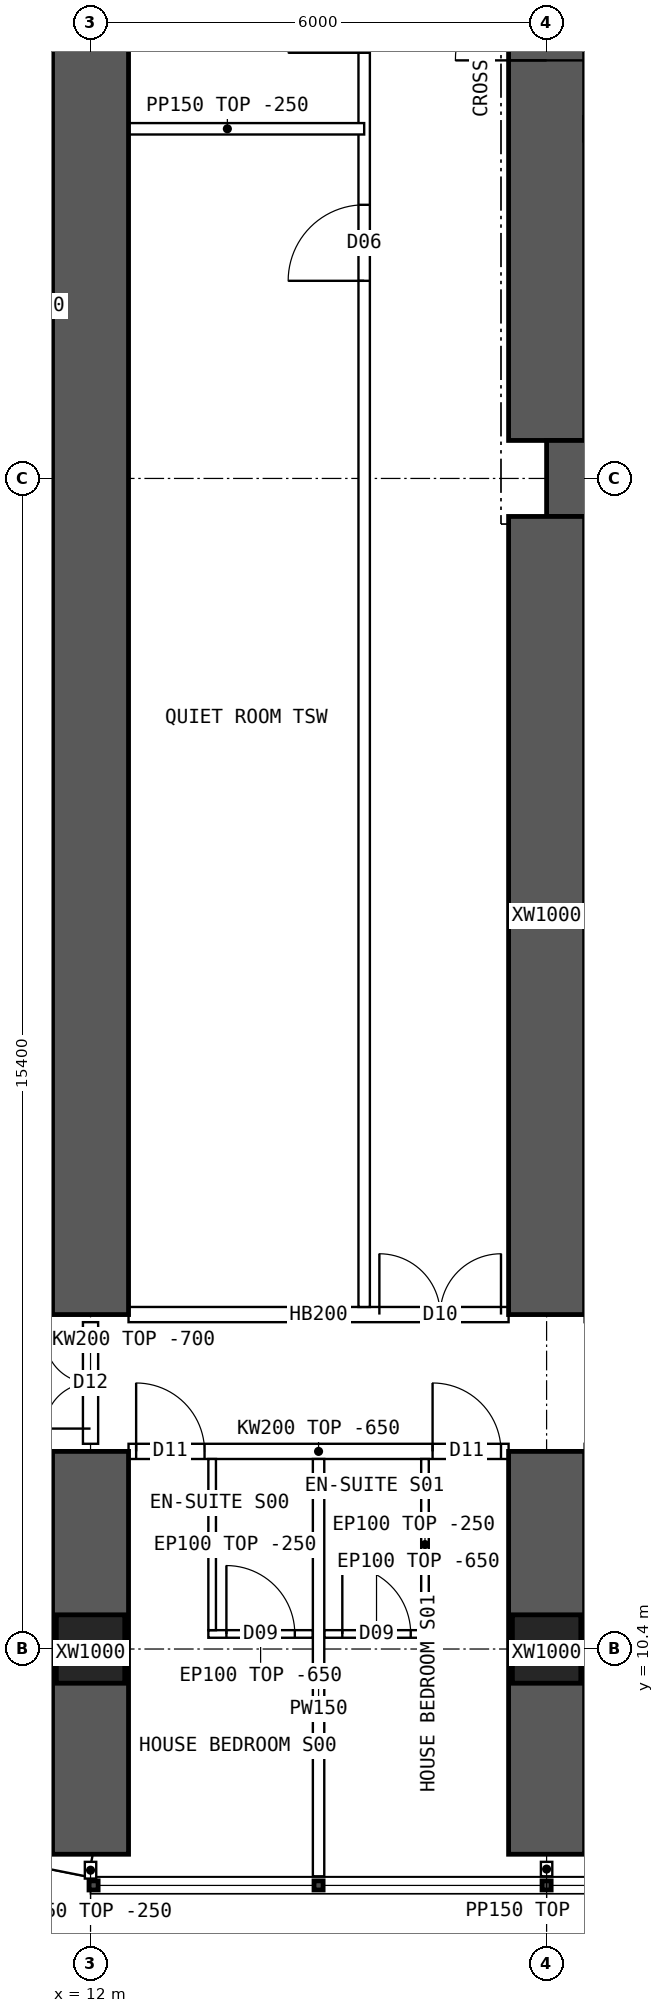
"""IFC4 building model, lengths in metres.
Left out: names, types, materials, properties, quantities, classifications, styles, units other than length and angle.
Written with IfcOpenShell. Run it as: python <this file> out.ifc"""

import sys

from ifc_helpers import new_model, si_unit, direction, frame, frame_2d, origin, origin_2d, place, context, subcontext, project, spatial, polyline, rectangle, hollow_rectangle, outline, extrude, element, fill, save


model = new_model("IFC4")
c1 = context("Model", 3, precision=1e-05, world=origin(), true_north=direction((0.0, 1.0)))
c2 = subcontext(c1, "Body", "Model", "MODEL_VIEW")
j1 = project(units=[si_unit("LENGTHUNIT", "METRE"), si_unit("PLANEANGLEUNIT", "RADIAN")], contexts=[c1])
p1 = place(None, origin())
s1 = spatial("IfcSite", under=j1, at=p1, CompositionType="ELEMENT")
p2 = place(p1, origin())
s2 = spatial("IfcBuilding", under=s1, at=p2, CompositionType="ELEMENT")
p3 = place(p2, frame((0.0, 0.0, 38.95)))
s3 = spatial("IfcBuildingStorey", under=s2, at=p3, CompositionType="ELEMENT", Elevation=38.95)
for number, where, z_axis, x_axis in (
    (1, (12.0, 10.4, 0.0), (0.0, 0.0, 1.0), (1.0, 0.0, 0.0)),
    (2, (18.0, 10.4, 0.0), (0.0, 0.0, 1.0), (1.0, 0.0, 0.0)),
):
    element("IfcColumn", number, at=place(p3, frame(where, z_axis=z_axis, x_axis=x_axis)), inside=s3, PredefinedType="COLUMN", context=c2, shape_type="SweptSolid", body=[
        extrude(hollow_rectangle(XDim=0.9, YDim=0.9, WallThickness=0.09, at=origin_2d()), origin(), (0.0, 0.0, 1.0), 3.75),
    ])
p4 = place(p3, frame((18.0, 25.8, 0.0), z_axis=(0.0, 0.0, 1.0), x_axis=(1.0, 0.0, 0.0)))
e3 = element("IfcWall", 3, at=p4, inside=s3, PredefinedType="SHEAR", context=c2, shape_type="SweptSolid", body=[
    extrude(rectangle(XDim=48.0, YDim=1.0, at=frame_2d((24.0, 0.0))), origin(), (0.0, 0.0, 1.0), 3.75),
])
p5 = place(p3, frame((18.0, 26.3, 0.0), z_axis=(0.0, 0.0, 1.0), x_axis=(0.0, 1.0, 0.0)))
e4 = element("IfcWall", 4, at=p5, inside=s3, PredefinedType="SHEAR", context=c2, shape_type="SweptSolid", body=[
    extrude(rectangle(XDim=11.4, YDim=1.0, at=frame_2d((5.7, 0.0))), origin(), (0.0, 0.0, 1.0), 3.75),
])
p6 = place(p5, frame((5.0, 0.0, 0.0)))
e5 = element("IfcOpeningElement", 5, at=p6, cuts=e4, PredefinedType="OPENING", context=c2, shape_type="SweptSolid", body=[
    extrude(rectangle(XDim=1.2, YDim=2.1, at=frame_2d((0.6, 1.05))), frame((0.0, 0.51, 0.0), z_axis=(0.0, -1.0, 0.0), x_axis=(1.0, 0.0, 0.0)), (0.0, 0.0, 1.0), 1.02),
])
p7 = place(p3, frame((12.0, 7.7, 0.0), z_axis=(0.0, 0.0, 1.0), x_axis=(0.0, 1.0, 0.0)))
e6 = element("IfcWall", 6, at=p7, inside=s3, PredefinedType="SHEAR", context=c2, shape_type="SweptSolid", body=[
    extrude(rectangle(XDim=5.3, YDim=1.0, at=frame_2d((2.65, 0.0))), origin(), (0.0, 0.0, 1.0), 3.75),
])
p8 = place(p3, frame((12.0, 14.8, 0.0), z_axis=(0.0, 0.0, 1.0), x_axis=(0.0, 1.0, 0.0)))
e7 = element("IfcWall", 7, at=p8, inside=s3, PredefinedType="SHEAR", context=c2, shape_type="SweptSolid", body=[
    extrude(rectangle(XDim=34.4, YDim=1.0, at=frame_2d((17.2, 0.0))), origin(), (0.0, 0.0, 1.0), 3.75),
])
p9 = place(p3, frame((18.0, 7.7, 0.0), z_axis=(0.0, 0.0, 1.0), x_axis=(0.0, 1.0, 0.0)))
e8 = element("IfcWall", 8, at=p9, inside=s3, PredefinedType="SHEAR", context=c2, shape_type="SweptSolid", body=[
    extrude(rectangle(XDim=5.3, YDim=1.0, at=frame_2d((2.65, 0.0))), origin(), (0.0, 0.0, 1.0), 3.75),
])
p10 = place(p3, frame((18.0, 14.8, 0.0), z_axis=(0.0, 0.0, 1.0), x_axis=(0.0, 1.0, 0.0)))
e9 = element("IfcWall", 9, at=p10, inside=s3, PredefinedType="SHEAR", context=c2, shape_type="SweptSolid", body=[
    extrude(rectangle(XDim=10.5, YDim=1.0, at=frame_2d((5.25, 0.0))), origin(), (0.0, 0.0, 1.0), 3.75),
])
p11 = place(p3, frame((8.843, 8.178, 0.0), z_axis=(0.0, 0.0, 1.0), x_axis=(0.980787251524, -0.195080412259, 0.0)))
e10 = element("IfcWall", 10, at=p11, inside=s3, PredefinedType="SOLIDWALL", context=c2, shape_type="SweptSolid", body=[
    extrude(outline(polyline([(-0.03, -0.15), (3.249, -0.15), (3.189, 0.15), (0.03, 0.15), (-0.03, -0.15)])), origin(), (0.0, 0.0, 1.0), 3.5),
])
p12 = place(p11, frame((0.909, 0.0, 0.9)))
e11 = element("IfcOpeningElement", 11, at=p12, cuts=e10, PredefinedType="OPENING", context=c2, shape_type="SweptSolid", body=[
    extrude(rectangle(XDim=1.4, YDim=1.8, at=frame_2d((0.7, 0.9))), frame((0.0, 0.16, 0.0), z_axis=(0.0, -1.0, 0.0), x_axis=(1.0, 0.0, 0.0)), (0.0, 0.0, 1.0), 0.32),
])
p13 = place(p3, frame((12.5, 13.0, 0.0), z_axis=(0.0, 0.0, 1.0), x_axis=(1.0, 0.0, 0.0)))
e12 = element("IfcWall", 12, at=p13, inside=s3, PredefinedType="SOLIDWALL", context=c2, shape_type="SweptSolid", body=[
    extrude(outline(polyline([(0.0, 0.0), (5.0, 0.0), (5.0, 3.1), (0.0, 3.1), (0.0, 0.0)])), frame((0.0, 0.1, 0.0), z_axis=(0.0, -1.0, 0.0), x_axis=(1.0, 0.0, 0.0)), (0.0, 0.0, 1.0), 0.2),
])
p14 = place(p13, frame((0.1, 0.0, 0.0)))
e13 = element("IfcOpeningElement", 13, at=p14, cuts=e12, PredefinedType="OPENING", context=c2, shape_type="SweptSolid", body=[
    extrude(rectangle(XDim=0.9, YDim=2.1, at=frame_2d((0.45, 1.05))), frame((0.0, 0.11, 0.0), z_axis=(0.0, -1.0, 0.0), x_axis=(1.0, 0.0, 0.0)), (0.0, 0.0, 1.0), 0.22),
])
p15 = place(p13, frame((4.0, 0.0, 0.0)))
e14 = element("IfcOpeningElement", 14, at=p15, cuts=e12, PredefinedType="OPENING", context=c2, shape_type="SweptSolid", body=[
    extrude(rectangle(XDim=0.9, YDim=2.1, at=frame_2d((0.45, 1.05))), frame((0.0, 0.11, 0.0), z_axis=(0.0, -1.0, 0.0), x_axis=(1.0, 0.0, 0.0)), (0.0, 0.0, 1.0), 0.22),
])
p16 = place(p3, frame((12.5, 14.8, 0.0), z_axis=(0.0, 0.0, 1.0), x_axis=(1.0, 0.0, 0.0)))
e15 = element("IfcWall", 15, at=p16, inside=s3, PredefinedType="SOLIDWALL", context=c2, shape_type="SweptSolid", body=[
    extrude(rectangle(XDim=5.0, YDim=0.2, at=frame_2d((2.5, 0.0))), origin(), (0.0, 0.0, 1.0), 3.5),
])
p17 = place(p16, frame((3.3, 0.0, 0.0)))
e16 = element("IfcOpeningElement", 16, at=p17, cuts=e15, PredefinedType="OPENING", context=c2, shape_type="SweptSolid", body=[
    extrude(rectangle(XDim=1.6, YDim=2.1, at=frame_2d((0.8, 1.05))), frame((0.0, 0.11, 0.0), z_axis=(0.0, -1.0, 0.0), x_axis=(1.0, 0.0, 0.0)), (0.0, 0.0, 1.0), 0.22),
])
p18 = place(p3, frame((15.0, 7.41, 0.0), z_axis=(0.0, 0.0, 1.0), x_axis=(0.0, 1.0, 0.0)))
e17 = element("IfcWall", 17, at=p18, inside=s3, PredefinedType="PARTITIONING", context=c2, shape_type="SweptSolid", body=[
    extrude(outline(polyline([(0.0, 0.0), (5.49, 0.0), (5.49, 3.1), (5.442, 3.1), (5.44, 3.5), (3.192, 3.5), (3.19, 3.1), (2.792, 3.1), (2.79, 3.5), (0.0, 3.5), (0.0, 0.0)])), frame((0.0, 0.075, 0.0), z_axis=(0.0, -1.0, 0.0), x_axis=(1.0, 0.0, 0.0)), (0.0, 0.0, 1.0), 0.15),
])
p19 = place(p3, frame((14.925, 10.598, 0.0), z_axis=(0.0, 0.0, 1.0), x_axis=(-1.0, 0.0, 0.0)))
e18 = element("IfcWall", 18, at=p19, inside=s3, PredefinedType="PARTITIONING", context=c2, shape_type="SweptSolid", body=[
    extrude(outline(polyline([(0.0, 0.0), (1.375, 0.0), (1.375, 3.1), (0.0, 3.1), (0.0, 0.0)])), frame((0.0, 0.05, 0.0), z_axis=(0.0, -1.0, 0.0), x_axis=(1.0, 0.0, 0.0)), (0.0, 0.0, 1.0), 0.1),
])
p20 = place(p19, frame((0.238, 0.0, 0.0)))
e19 = element("IfcOpeningElement", 19, at=p20, cuts=e18, PredefinedType="OPENING", context=c2, shape_type="SweptSolid", body=[
    extrude(rectangle(XDim=0.9, YDim=2.1, at=frame_2d((0.45, 1.05))), frame((0.0, 0.06, 0.0), z_axis=(0.0, -1.0, 0.0), x_axis=(1.0, 0.0, 0.0)), (0.0, 0.0, 1.0), 0.12),
])
p21 = place(p3, frame((13.6, 10.648, 0.0), z_axis=(0.0, 0.0, 1.0), x_axis=(0.0, 1.0, 0.0)))
e20 = element("IfcWall", 20, at=p21, inside=s3, PredefinedType="PARTITIONING", context=c2, shape_type="SweptSolid", body=[
    extrude(outline(polyline([(0.0, 0.0), (2.252, 0.0), (2.252, 3.1), (2.204, 3.1), (2.202, 3.5), (0.0, 3.5), (0.0, 0.0)])), frame((0.0, 0.05, 0.0), z_axis=(0.0, -1.0, 0.0), x_axis=(1.0, 0.0, 0.0)), (0.0, 0.0, 1.0), 0.1),
])
p22 = place(p3, frame((16.45, 10.598, 0.0), z_axis=(0.0, 0.0, 1.0), x_axis=(-1.0, 0.0, 0.0)))
e21 = element("IfcWall", 21, at=p22, inside=s3, PredefinedType="PARTITIONING", context=c2, shape_type="SweptSolid", body=[
    extrude(outline(polyline([(0.0, 0.0), (1.375, 0.0), (1.375, 3.1), (0.0, 3.1), (0.0, 0.0)])), frame((0.0, 0.05, 0.0), z_axis=(0.0, -1.0, 0.0), x_axis=(1.0, 0.0, 0.0)), (0.0, 0.0, 1.0), 0.1),
])
p23 = place(p22, frame((0.238, 0.0, 0.0)))
e22 = element("IfcOpeningElement", 22, at=p23, cuts=e21, PredefinedType="OPENING", context=c2, shape_type="SweptSolid", body=[
    extrude(rectangle(XDim=0.9, YDim=2.1, at=frame_2d((0.45, 1.05))), frame((0.0, 0.06, 0.0), z_axis=(0.0, -1.0, 0.0), x_axis=(1.0, 0.0, 0.0)), (0.0, 0.0, 1.0), 0.12),
])
p24 = place(p3, frame((16.4, 10.648, 0.0), z_axis=(0.0, 0.0, 1.0), x_axis=(0.0, 1.0, 0.0)))
e23 = element("IfcWall", 23, at=p24, inside=s3, PredefinedType="PARTITIONING", context=c2, shape_type="SweptSolid", body=[
    extrude(outline(polyline([(0.0, 0.0), (2.252, 0.0), (2.252, 3.1), (2.204, 3.1), (2.202, 3.5), (0.0, 3.5), (0.0, 0.0)])), frame((0.0, 0.05, 0.0), z_axis=(0.0, -1.0, 0.0), x_axis=(1.0, 0.0, 0.0)), (0.0, 0.0, 1.0), 0.1),
])
p25 = place(p3, frame((15.6, 14.9, 0.0), z_axis=(0.0, 0.0, 1.0), x_axis=(0.0, 1.0, 0.0)))
e24 = element("IfcWall", 24, at=p25, inside=s3, PredefinedType="PARTITIONING", context=c2, shape_type="SweptSolid", body=[
    extrude(rectangle(XDim=34.2, YDim=0.15, at=frame_2d((17.1, 0.0))), origin(), (0.0, 0.0, 1.0), 3.5),
])
p26 = place(p25, frame((13.5, 0.0, 0.0)))
e25 = element("IfcOpeningElement", 25, at=p26, cuts=e24, PredefinedType="OPENING", context=c2, shape_type="SweptSolid", body=[
    extrude(rectangle(XDim=1.0, YDim=2.1, at=frame_2d((0.5, 1.05))), frame((0.0, 0.085, 0.0), z_axis=(0.0, -1.0, 0.0), x_axis=(1.0, 0.0, 0.0)), (0.0, 0.0, 1.0), 0.17),
])
p27 = place(p25, frame((16.5, 0.0, 0.0)))
e26 = element("IfcOpeningElement", 26, at=p27, cuts=e24, PredefinedType="OPENING", context=c2, shape_type="SweptSolid", body=[
    extrude(rectangle(XDim=1.0, YDim=2.1, at=frame_2d((0.5, 1.05))), frame((0.0, 0.085, 0.0), z_axis=(0.0, -1.0, 0.0), x_axis=(1.0, 0.0, 0.0)), (0.0, 0.0, 1.0), 0.17),
])
p28 = place(p3, frame((12.0, 30.4, 0.0), z_axis=(0.0, 0.0, 1.0), x_axis=(1.0, 0.0, 0.0)))
e27 = element("IfcWall", 27, at=p28, inside=s3, PredefinedType="PARTITIONING", context=c2, shape_type="SweptSolid", body=[
    extrude(rectangle(XDim=3.6, YDim=0.15, at=frame_2d((1.8, 0.0))), origin(), (0.0, 0.0, 1.0), 3.5),
])
p29 = place(p3, frame((3.905, 30.85, 0.0), z_axis=(0.0, 0.0, 1.0), x_axis=(1.0, 0.0, 0.0)))
e28 = element("IfcWall", 28, at=p29, inside=s3, PredefinedType="PARTITIONING", context=c2, shape_type="SweptSolid", body=[
    extrude(outline(polyline([(0.0, 0.0), (8.02, 0.0), (8.02, 3.5), (2.397, 3.5), (2.395, 3.05), (1.797, 3.05), (1.795, 3.5), (0.0, 3.5), (0.0, 0.0)])), frame((0.0, 0.075, 0.0), z_axis=(0.0, -1.0, 0.0), x_axis=(1.0, 0.0, 0.0)), (0.0, 0.0, 1.0), 0.15),
])
p30 = place(p3, frame((12.0, 13.1, 0.0), z_axis=(0.0, 0.0, 1.0), x_axis=(0.0, 1.0, 0.0)))
e29 = element("IfcWall", 29, at=p30, inside=s3, PredefinedType="SOLIDWALL", context=c2, shape_type="SweptSolid", body=[
    extrude(outline(polyline([(0.0, 0.0), (1.6, 0.0), (1.6, 3.05), (0.0, 3.05), (0.0, 0.0)])), frame((0.0, 0.1, 0.0), z_axis=(0.0, -1.0, 0.0), x_axis=(1.0, 0.0, 0.0)), (0.0, 0.0, 1.0), 0.2),
])
p31 = place(p30, frame((0.2, 0.0, 0.0)))
e30 = element("IfcOpeningElement", 30, at=p31, cuts=e29, PredefinedType="OPENING", context=c2, shape_type="SweptSolid", body=[
    extrude(rectangle(XDim=1.2, YDim=2.1, at=frame_2d((0.6, 1.05))), frame((0.0, 0.11, 0.0), z_axis=(0.0, -1.0, 0.0), x_axis=(1.0, 0.0, 0.0)), (0.0, 0.0, 1.0), 0.22),
])
p32 = place(p3, frame((12.0, 7.6, 0.0), z_axis=(0.0, 0.0, 1.0), x_axis=(0.0, -1.0, 0.0)))
e31 = element("IfcWall", 31, at=p32, inside=s3, PredefinedType="PARTITIONING", context=c2, shape_type="SweptSolid", body=[
    extrude(rectangle(XDim=0.22, YDim=0.15, at=frame_2d((0.11, 0.0))), origin(), (0.0, 0.0, 1.0), 3.5),
])
p33 = place(p3, frame((18.0, 7.6, 0.0), z_axis=(0.0, 0.0, 1.0), x_axis=(0.0, -1.0, 0.0)))
e32 = element("IfcWall", 32, at=p33, inside=s3, PredefinedType="PARTITIONING", context=c2, shape_type="SweptSolid", body=[
    extrude(rectangle(XDim=0.19, YDim=0.15, at=frame_2d((0.095, 0.0))), origin(), (0.0, 0.0, 1.0), 3.5),
])
p34 = place(p6, origin())
e33 = element("IfcDoor", 33, at=p34, inside=s3, OperationType="SINGLE_SWING_LEFT", PredefinedType="DOOR", context=c2, shape_type="SweptSolid", body=[
    extrude(rectangle(XDim=1.2, YDim=2.1, at=frame_2d((0.6, 1.05))), frame((0.0, 0.025, 0.0), z_axis=(0.0, -1.0, 0.0), x_axis=(1.0, 0.0, 0.0)), (0.0, 0.0, 1.0), 0.05),
])
fill(e5, e33)
p35 = place(p17, origin())
e34 = element("IfcDoor", 34, at=p35, inside=s3, OperationType="DOUBLE_DOOR_SINGLE_SWING", PredefinedType="DOOR", context=c2, shape_type="SweptSolid", body=[
    extrude(rectangle(XDim=1.6, YDim=2.1, at=frame_2d((0.8, 1.05))), frame((0.0, 0.025, 0.0), z_axis=(0.0, -1.0, 0.0), x_axis=(1.0, 0.0, 0.0)), (0.0, 0.0, 1.0), 0.05),
])
fill(e16, e34)
p36 = place(p20, origin())
e35 = element("IfcDoor", 35, at=p36, inside=s3, OperationType="SINGLE_SWING_RIGHT", PredefinedType="DOOR", context=c2, shape_type="SweptSolid", body=[
    extrude(rectangle(XDim=0.9, YDim=2.1, at=frame_2d((0.45, 1.05))), frame((0.0, 0.025, 0.0), z_axis=(0.0, -1.0, 0.0), x_axis=(1.0, 0.0, 0.0)), (0.0, 0.0, 1.0), 0.05),
])
fill(e19, e35)
p37 = place(p14, origin())
e36 = element("IfcDoor", 36, at=p37, inside=s3, OperationType="SINGLE_SWING_LEFT", PredefinedType="DOOR", context=c2, shape_type="SweptSolid", body=[
    extrude(rectangle(XDim=0.9, YDim=2.1, at=frame_2d((0.45, 1.05))), frame((0.0, 0.025, 0.0), z_axis=(0.0, -1.0, 0.0), x_axis=(1.0, 0.0, 0.0)), (0.0, 0.0, 1.0), 0.05),
])
fill(e13, e36)
p38 = place(p23, origin())
e37 = element("IfcDoor", 37, at=p38, inside=s3, OperationType="SINGLE_SWING_RIGHT", PredefinedType="DOOR", context=c2, shape_type="SweptSolid", body=[
    extrude(rectangle(XDim=0.9, YDim=2.1, at=frame_2d((0.45, 1.05))), frame((0.0, 0.025, 0.0), z_axis=(0.0, -1.0, 0.0), x_axis=(1.0, 0.0, 0.0)), (0.0, 0.0, 1.0), 0.05),
])
fill(e22, e37)
p39 = place(p15, origin())
e38 = element("IfcDoor", 38, at=p39, inside=s3, OperationType="SINGLE_SWING_LEFT", PredefinedType="DOOR", context=c2, shape_type="SweptSolid", body=[
    extrude(rectangle(XDim=0.9, YDim=2.1, at=frame_2d((0.45, 1.05))), frame((0.0, 0.025, 0.0), z_axis=(0.0, -1.0, 0.0), x_axis=(1.0, 0.0, 0.0)), (0.0, 0.0, 1.0), 0.05),
])
fill(e14, e38)
p40 = place(p26, origin())
e39 = element("IfcDoor", 39, at=p40, inside=s3, OperationType="SINGLE_SWING_LEFT", PredefinedType="DOOR", context=c2, shape_type="SweptSolid", body=[
    extrude(rectangle(XDim=1.0, YDim=2.1, at=frame_2d((0.5, 1.05))), frame((0.0, 0.025, 0.0), z_axis=(0.0, -1.0, 0.0), x_axis=(1.0, 0.0, 0.0)), (0.0, 0.0, 1.0), 0.05),
])
fill(e25, e39)
p41 = place(p31, origin())
e40 = element("IfcDoor", 40, at=p41, inside=s3, OperationType="DOUBLE_DOOR_SINGLE_SWING", PredefinedType="DOOR", context=c2, shape_type="SweptSolid", body=[
    extrude(rectangle(XDim=1.2, YDim=2.1, at=frame_2d((0.6, 1.05))), frame((0.0, 0.025, 0.0), z_axis=(0.0, -1.0, 0.0), x_axis=(1.0, 0.0, 0.0)), (0.0, 0.0, 1.0), 0.05),
])
fill(e30, e40)
save(model, sys.argv[1])
